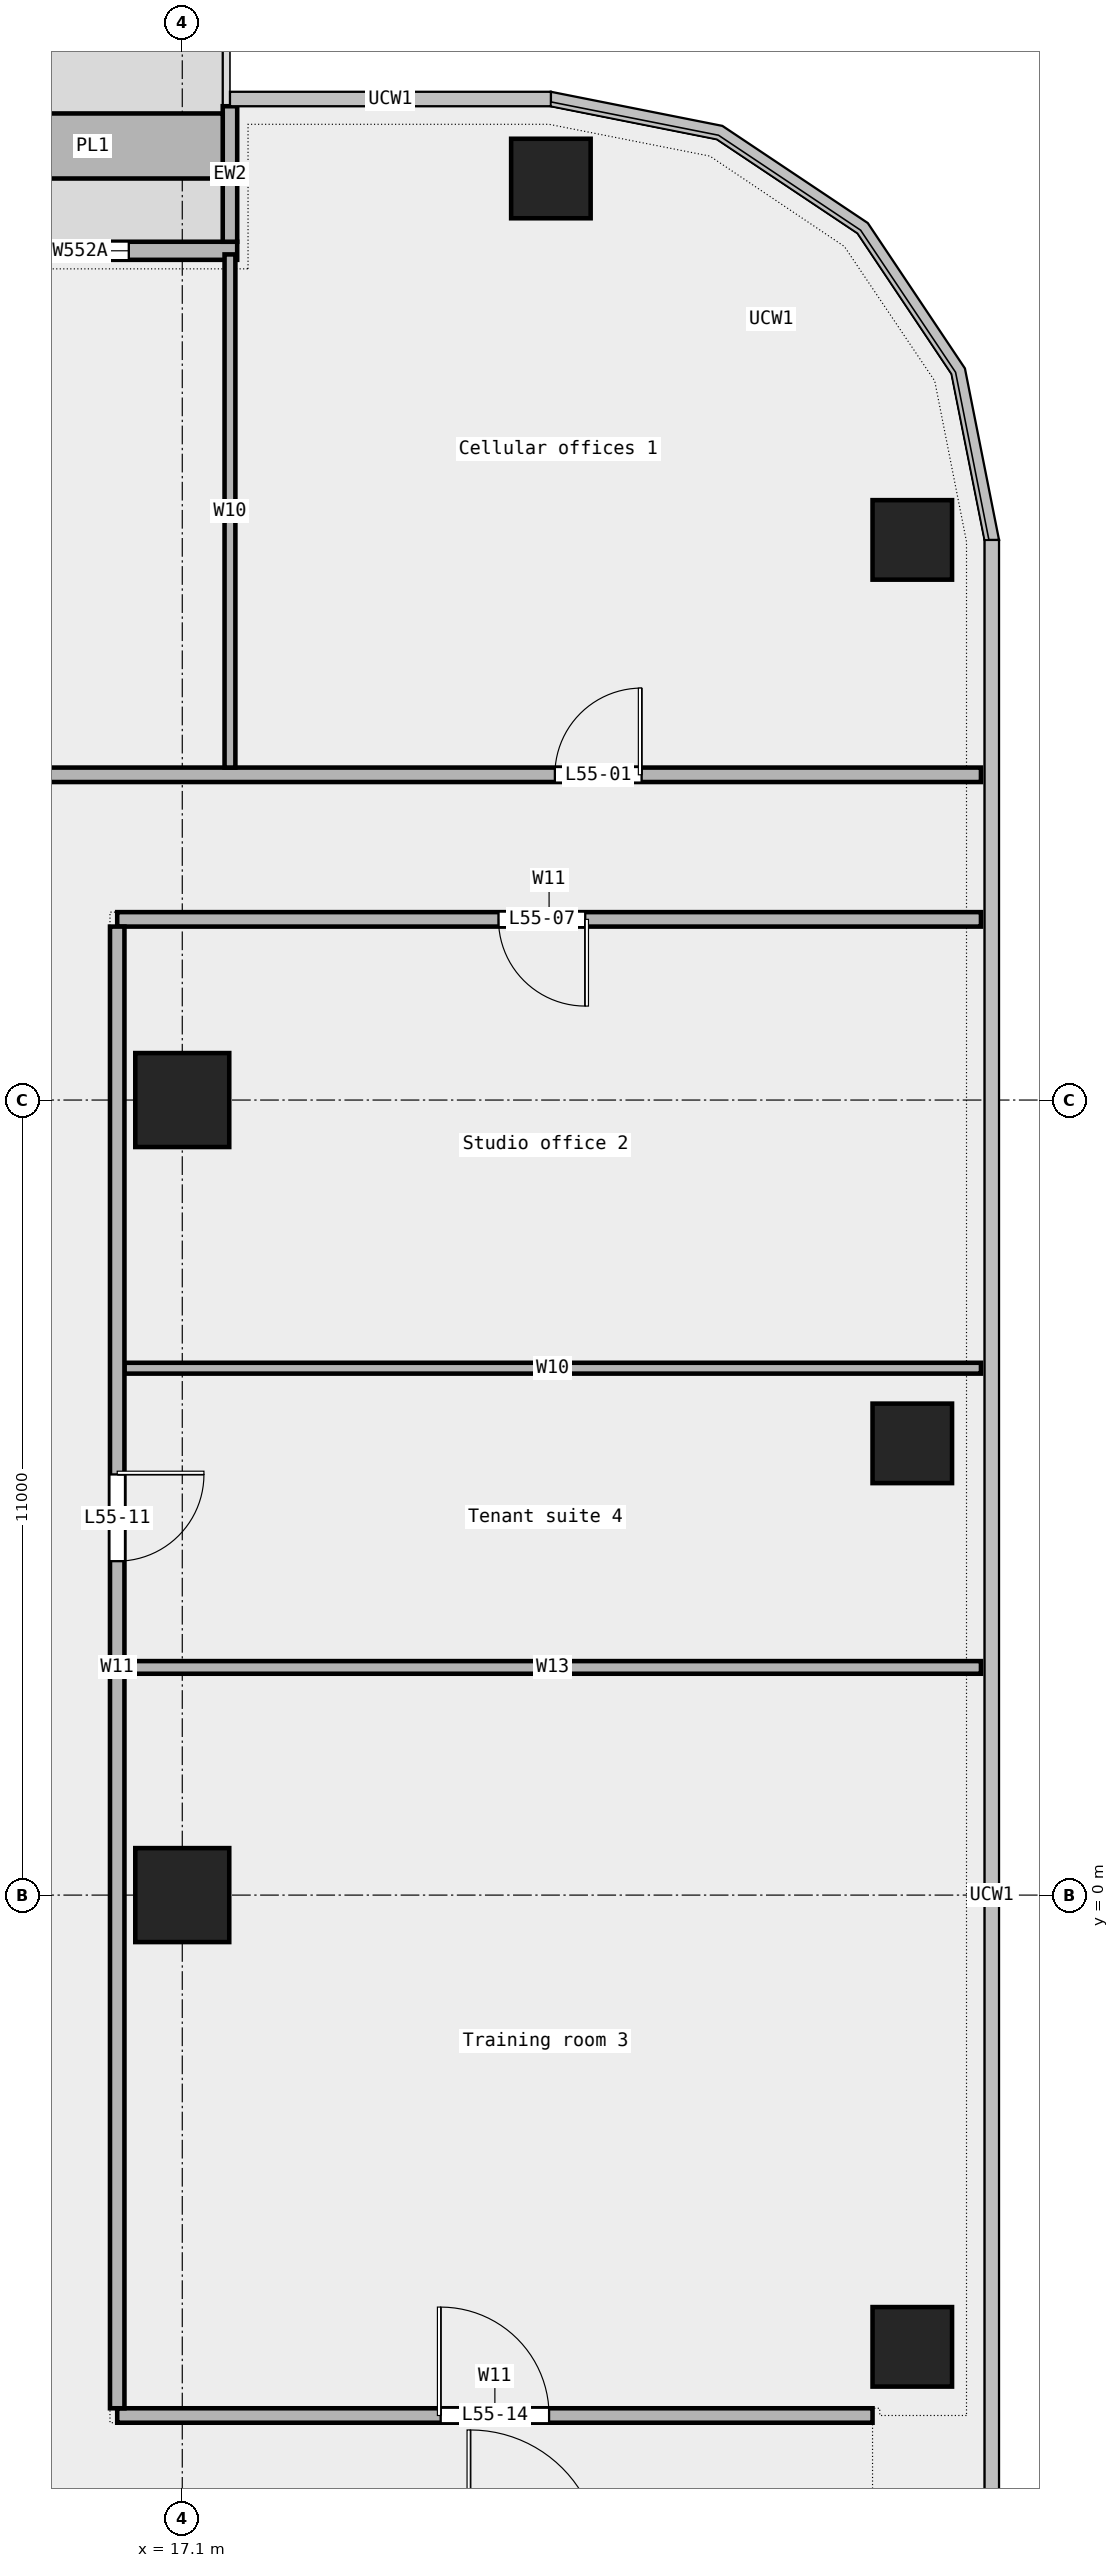
"""IFC4 building model, lengths in metres.
Left out: names, types, materials, properties, quantities, classifications, styles, units other than length and angle.
Written with IfcOpenShell. Run it as: python <this file> out.ifc"""

import sys

from ifc_helpers import new_model, si_unit, direction, frame, frame_2d, origin, origin_2d, place, context, subcontext, project, spatial, rectangle, extrude, element, fill, save


model = new_model("IFC4")
c1 = context("Model", 3, precision=1e-05, world=origin(), true_north=direction((0.0, 1.0)))
c2 = subcontext(c1, "Body", "Model", "MODEL_VIEW")
j1 = project(units=[si_unit("LENGTHUNIT", "METRE"), si_unit("PLANEANGLEUNIT", "RADIAN")], contexts=[c1])
p1 = place(None, origin())
s1 = spatial("IfcSite", under=j1, at=p1, CompositionType="ELEMENT")
p2 = place(p1, origin())
s2 = spatial("IfcBuilding", under=s1, at=p2, CompositionType="ELEMENT")
p3 = place(p2, frame((0.0, 0.0, 255.0)))
s3 = spatial("IfcBuildingStorey", under=s2, at=p3, CompositionType="ELEMENT", Elevation=255.0)
for number, where, z_axis, x_axis in (
    (1, (27.2, -6.25, 0.0), (0.0, 0.0, 1.0), (1.0, 0.0, 0.0)),
    (2, (27.2, 6.25, 0.0), (0.0, 0.0, 1.0), (1.0, 0.0, 0.0)),
    (3, (27.2, 18.75, 0.0), (0.0, 0.0, 1.0), (1.0, 0.0, 0.0)),
    (4, (22.2, 23.75, 0.0), (0.0, 0.0, 1.0), (1.0, 0.0, 0.0)),
):
    element("IfcColumn", number, at=place(p3, frame(where, z_axis=z_axis, x_axis=x_axis)), inside=s3, PredefinedType="COLUMN", context=c2, shape_type="SweptSolid", body=[
        extrude(rectangle(XDim=1.1, YDim=1.1, at=origin_2d()), origin(), (0.0, 0.0, 1.0), 3.4),
    ])
for number, where, z_axis, x_axis in (
    (5, (17.1, 0.0, 0.0), (0.0, 0.0, 1.0), (1.0, 0.0, 0.0)),
    (6, (17.1, 11.0, 0.0), (0.0, 0.0, 1.0), (1.0, 0.0, 0.0)),
):
    element("IfcColumn", number, at=place(p3, frame(where, z_axis=z_axis, x_axis=x_axis)), inside=s3, PredefinedType="COLUMN", context=c2, shape_type="SweptSolid", body=[
        extrude(rectangle(XDim=1.3, YDim=1.3, at=origin_2d()), origin(), (0.0, 0.0, 1.0), 3.4),
    ])
p4 = place(p3, frame((17.86, 22.75, 0.0), z_axis=(0.0, 0.0, 1.0), x_axis=(-1.0, 0.0, 0.0)))
e7 = element("IfcWall", 7, at=p4, inside=s3, PredefinedType="STANDARD", context=c2, shape_type="SweptSolid", body=[
    extrude(rectangle(XDim=13.52, YDim=0.25, at=frame_2d((6.76, 0.0))), origin(), (0.0, 0.0, 1.0), 3.4),
])
p5 = place(p4, frame((1.5, 0.0, 0.45)))
e8 = element("IfcOpeningElement", 8, at=p5, cuts=e7, PredefinedType="OPENING", context=c2, shape_type="SweptSolid", body=[
    extrude(rectangle(XDim=1.5, YDim=2.4, at=frame_2d((0.75, 1.2))), frame((0.0, 0.137, 0.0), z_axis=(0.0, -1.0, 0.0), x_axis=(1.0, 0.0, 0.0)), (0.0, 0.0, 1.0), 0.274),
])
p6 = place(p4, frame((4.0, 0.0, 0.0)))
e9 = element("IfcOpeningElement", 9, at=p6, cuts=e7, PredefinedType="OPENING", context=c2, shape_type="SweptSolid", body=[
    extrude(rectangle(XDim=1.8, YDim=2.4, at=frame_2d((0.9, 1.2))), frame((0.0, 0.137, 0.0), z_axis=(0.0, -1.0, 0.0), x_axis=(1.0, 0.0, 0.0)), (0.0, 0.0, 1.0), 0.274),
])
p7 = place(p4, frame((10.5, 0.0, 0.45)))
e10 = element("IfcOpeningElement", 10, at=p7, cuts=e7, PredefinedType="OPENING", context=c2, shape_type="SweptSolid", body=[
    extrude(rectangle(XDim=1.5, YDim=2.4, at=frame_2d((0.75, 1.2))), frame((0.0, 0.137, 0.0), z_axis=(0.0, -1.0, 0.0), x_axis=(1.0, 0.0, 0.0)), (0.0, 0.0, 1.0), 0.274),
])
p8 = place(p3, frame((17.76, 24.75, 0.0), z_axis=(0.0, 0.0, 1.0), x_axis=(0.0, -1.0, 0.0)))
e11 = element("IfcWall", 11, at=p8, inside=s3, PredefinedType="STANDARD", context=c2, shape_type="SweptSolid", body=[
    extrude(rectangle(XDim=1.875, YDim=0.2, at=frame_2d((0.938, 0.0))), origin(), (0.0, 0.0, 1.0), 3.4),
])
p9 = place(p3, frame((17.66, 24.2, 0.0), z_axis=(0.0, 0.0, 1.0), x_axis=(-1.0, 0.0, 0.0)))
e12 = element("IfcWall", 12, at=p9, inside=s3, PredefinedType="STANDARD", context=c2, shape_type="SweptSolid", body=[
    extrude(rectangle(XDim=3.6, YDim=0.9, at=frame_2d((1.8, 0.0))), origin(), (0.0, 0.0, 1.0), 0.7),
])
p10 = place(p3, frame((16.2, -7.2, 0.0), z_axis=(0.0, 0.0, 1.0), x_axis=(1.0, 0.0, 0.0)))
e13 = element("IfcWall", 13, at=p10, inside=s3, PredefinedType="PARTITIONING", context=c2, shape_type="SweptSolid", body=[
    extrude(rectangle(XDim=10.45, YDim=0.2, at=frame_2d((5.225, 0.0))), origin(), (0.0, 0.0, 1.0), 3.4),
])
p11 = place(p10, frame((4.475, 0.0, 0.0)))
e14 = element("IfcOpeningElement", 14, at=p11, cuts=e13, PredefinedType="OPENING", context=c2, shape_type="SweptSolid", body=[
    extrude(rectangle(XDim=1.5, YDim=2.1, at=frame_2d((0.75, 1.05))), frame((0.0, 0.112, 0.0), z_axis=(0.0, -1.0, 0.0), x_axis=(1.0, 0.0, 0.0)), (0.0, 0.0, 1.0), 0.224),
])
p12 = place(p3, frame((16.3, 3.15, 0.0), z_axis=(0.0, 0.0, 1.0), x_axis=(1.0, 0.0, 0.0)))
e15 = element("IfcWall", 15, at=p12, inside=s3, PredefinedType="PARTITIONING", context=c2, shape_type="SweptSolid", body=[
    extrude(rectangle(XDim=11.85, YDim=0.175, at=frame_2d((5.925, 0.0))), origin(), (0.0, 0.0, 1.0), 3.4),
])
p13 = place(p3, frame((16.3, 7.29, 0.0), z_axis=(0.0, 0.0, 1.0), x_axis=(1.0, 0.0, 0.0)))
e16 = element("IfcWall", 16, at=p13, inside=s3, PredefinedType="PARTITIONING", context=c2, shape_type="SweptSolid", body=[
    extrude(rectangle(XDim=11.85, YDim=0.15, at=frame_2d((5.925, 0.0))), origin(), (0.0, 0.0, 1.0), 3.4),
])
p14 = place(p3, frame((16.2, 13.5, 0.0), z_axis=(0.0, 0.0, 1.0), x_axis=(1.0, 0.0, 0.0)))
e17 = element("IfcWall", 17, at=p14, inside=s3, PredefinedType="PARTITIONING", context=c2, shape_type="SweptSolid", body=[
    extrude(rectangle(XDim=11.95, YDim=0.2, at=frame_2d((5.975, 0.0))), origin(), (0.0, 0.0, 1.0), 3.4),
])
p15 = place(p14, frame((5.275, 0.0, 0.0)))
e18 = element("IfcOpeningElement", 18, at=p15, cuts=e17, PredefinedType="OPENING", context=c2, shape_type="SweptSolid", body=[
    extrude(rectangle(XDim=1.2, YDim=2.1, at=frame_2d((0.6, 1.05))), frame((0.0, 0.112, 0.0), z_axis=(0.0, -1.0, 0.0), x_axis=(1.0, 0.0, 0.0)), (0.0, 0.0, 1.0), 0.224),
])
p16 = place(p3, frame((-28.15, 15.5, 0.0), z_axis=(0.0, 0.0, 1.0), x_axis=(1.0, 0.0, 0.0)))
e19 = element("IfcWall", 19, at=p16, inside=s3, PredefinedType="PARTITIONING", context=c2, shape_type="SweptSolid", body=[
    extrude(rectangle(XDim=56.3, YDim=0.2, at=frame_2d((28.15, 0.0))), origin(), (0.0, 0.0, 1.0), 3.4),
])
p17 = place(p16, frame((50.405, 0.0, 0.0)))
e20 = element("IfcOpeningElement", 20, at=p17, cuts=e19, PredefinedType="OPENING", context=c2, shape_type="SweptSolid", body=[
    extrude(rectangle(XDim=1.2, YDim=2.1, at=frame_2d((0.6, 1.05))), frame((0.0, 0.112, 0.0), z_axis=(0.0, -1.0, 0.0), x_axis=(1.0, 0.0, 0.0)), (0.0, 0.0, 1.0), 0.224),
])
p18 = place(p16, frame((38.5, 0.0, 0.0)))
e21 = element("IfcOpeningElement", 21, at=p18, cuts=e19, PredefinedType="OPENING", context=c2, shape_type="SweptSolid", body=[
    extrude(rectangle(XDim=1.5, YDim=2.1, at=frame_2d((0.75, 1.05))), frame((0.0, 0.112, 0.0), z_axis=(0.0, -1.0, 0.0), x_axis=(1.0, 0.0, 0.0)), (0.0, 0.0, 1.0), 0.224),
])
p19 = place(p16, frame((30.853, 0.0, 0.0)))
e22 = element("IfcOpeningElement", 22, at=p19, cuts=e19, PredefinedType="OPENING", context=c2, shape_type="SweptSolid", body=[
    extrude(rectangle(XDim=0.9, YDim=2.1, at=frame_2d((0.45, 1.05))), frame((0.0, 0.112, 0.0), z_axis=(0.0, -1.0, 0.0), x_axis=(1.0, 0.0, 0.0)), (0.0, 0.0, 1.0), 0.224),
])
p20 = place(p16, frame((19.798, 0.0, 0.0)))
e23 = element("IfcOpeningElement", 23, at=p20, cuts=e19, PredefinedType="OPENING", context=c2, shape_type="SweptSolid", body=[
    extrude(rectangle(XDim=1.8, YDim=2.1, at=frame_2d((0.9, 1.05))), frame((0.0, 0.112, 0.0), z_axis=(0.0, -1.0, 0.0), x_axis=(1.0, 0.0, 0.0)), (0.0, 0.0, 1.0), 0.224),
])
p21 = place(p16, frame((5.04, 0.0, 0.0)))
e24 = element("IfcOpeningElement", 24, at=p21, cuts=e19, PredefinedType="OPENING", context=c2, shape_type="SweptSolid", body=[
    extrude(rectangle(XDim=1.5, YDim=2.1, at=frame_2d((0.75, 1.05))), frame((0.0, 0.112, 0.0), z_axis=(0.0, -1.0, 0.0), x_axis=(1.0, 0.0, 0.0)), (0.0, 0.0, 1.0), 0.224),
])
p22 = place(p3, frame((16.2, -7.1, 0.0), z_axis=(0.0, 0.0, 1.0), x_axis=(0.0, 1.0, 0.0)))
e25 = element("IfcWall", 25, at=p22, inside=s3, PredefinedType="PARTITIONING", context=c2, shape_type="SweptSolid", body=[
    extrude(rectangle(XDim=20.5, YDim=0.2, at=frame_2d((10.25, 0.0))), origin(), (0.0, 0.0, 1.0), 3.4),
])
p23 = place(p22, frame((11.72, 0.0, 0.0)))
e26 = element("IfcOpeningElement", 26, at=p23, cuts=e25, PredefinedType="OPENING", context=c2, shape_type="SweptSolid", body=[
    extrude(rectangle(XDim=1.2, YDim=2.1, at=frame_2d((0.6, 1.05))), frame((0.0, 0.112, 0.0), z_axis=(0.0, -1.0, 0.0), x_axis=(1.0, 0.0, 0.0)), (0.0, 0.0, 1.0), 0.224),
])
p24 = place(p3, frame((17.76, 15.6, 0.0), z_axis=(0.0, 0.0, 1.0), x_axis=(0.0, 1.0, 0.0)))
e27 = element("IfcWall", 27, at=p24, inside=s3, PredefinedType="PARTITIONING", context=c2, shape_type="SweptSolid", body=[
    extrude(rectangle(XDim=7.1, YDim=0.15, at=frame_2d((3.55, 0.0))), origin(), (0.0, 0.0, 1.0), 3.4),
])
p25 = place(p5, origin())
e28 = element("IfcWindow", 28, at=p25, inside=s3, PartitioningType="SINGLE_PANEL", PredefinedType="WINDOW", context=c2, shape_type="SweptSolid", body=[
    extrude(rectangle(XDim=1.5, YDim=2.4, at=frame_2d((0.75, 1.2))), frame((0.0, 0.03, 0.0), z_axis=(0.0, -1.0, 0.0), x_axis=(1.0, 0.0, 0.0)), (0.0, 0.0, 1.0), 0.06),
])
fill(e8, e28)
p26 = place(p17, origin())
e29 = element("IfcDoor", 29, at=p26, inside=s3, OperationType="SINGLE_SWING_RIGHT", PredefinedType="DOOR", context=c2, shape_type="SweptSolid", body=[
    extrude(rectangle(XDim=1.2, YDim=2.1, at=frame_2d((0.6, 1.05))), frame((0.0, 0.025, 0.0), z_axis=(0.0, -1.0, 0.0), x_axis=(1.0, 0.0, 0.0)), (0.0, 0.0, 1.0), 0.05),
])
fill(e20, e29)
p27 = place(p15, origin())
e30 = element("IfcDoor", 30, at=p27, inside=s3, OperationType="SINGLE_SWING_LEFT", PredefinedType="DOOR", context=c2, shape_type="SweptSolid", body=[
    extrude(rectangle(XDim=1.2, YDim=2.1, at=frame_2d((0.6, 1.05))), frame((0.0, 0.025, 0.0), z_axis=(0.0, -1.0, 0.0), x_axis=(1.0, 0.0, 0.0)), (0.0, 0.0, 1.0), 0.05),
])
fill(e18, e30)
p28 = place(p23, origin())
e31 = element("IfcDoor", 31, at=p28, inside=s3, OperationType="SINGLE_SWING_LEFT", PredefinedType="DOOR", context=c2, shape_type="SweptSolid", body=[
    extrude(rectangle(XDim=1.2, YDim=2.1, at=frame_2d((0.6, 1.05))), frame((0.0, 0.025, 0.0), z_axis=(0.0, -1.0, 0.0), x_axis=(1.0, 0.0, 0.0)), (0.0, 0.0, 1.0), 0.05),
])
fill(e26, e31)
p29 = place(p11, origin())
e32 = element("IfcDoor", 32, at=p29, inside=s3, OperationType="DOUBLE_DOOR_SINGLE_SWING", PredefinedType="DOOR", context=c2, shape_type="SweptSolid", body=[
    extrude(rectangle(XDim=1.5, YDim=2.1, at=frame_2d((0.75, 1.05))), frame((0.0, 0.025, 0.0), z_axis=(0.0, -1.0, 0.0), x_axis=(1.0, 0.0, 0.0)), (0.0, 0.0, 1.0), 0.05),
])
fill(e14, e32)
save(model, sys.argv[1])
